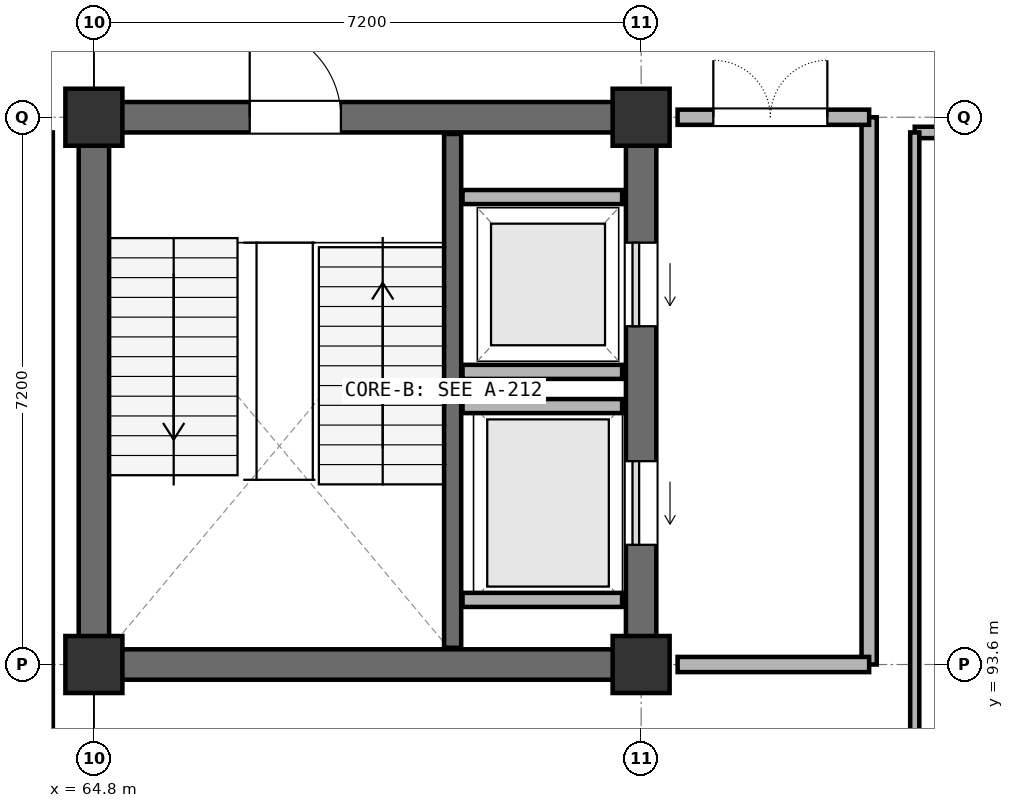
"""IFC4 building model, lengths in metres.
Left out: names, types, materials, properties, quantities, classifications, styles, units other than length and angle.
Written with IfcOpenShell. Run it as: python <this file> out.ifc"""

import sys

from ifc_helpers import new_model, si_unit, direction, frame, frame_2d, origin, origin_2d, place, context, subcontext, project, spatial, rectangle, extrude, element, fill, save


model = new_model("IFC4")
c1 = context("Model", 3, precision=1e-05, world=origin(), true_north=direction((0.0, 1.0)))
c2 = subcontext(c1, "Body", "Model", "MODEL_VIEW")
j1 = project(units=[si_unit("LENGTHUNIT", "METRE"), si_unit("PLANEANGLEUNIT", "RADIAN")], contexts=[c1])
p1 = place(None, origin())
s1 = spatial("IfcSite", under=j1, at=p1, CompositionType="ELEMENT")
p2 = place(p1, origin())
s2 = spatial("IfcBuilding", under=s1, at=p2, CompositionType="ELEMENT")
p3 = place(p2, frame((0.0, 0.0, 14.4)))
s3 = spatial("IfcBuildingStorey", under=s2, at=p3, CompositionType="ELEMENT", Elevation=14.4)
for number, where, z_axis, x_axis in (
    (1, (64.8, 93.6, 0.0), (0.0, 0.0, 1.0), (1.0, 0.0, 0.0)),
    (2, (64.8, 100.8, 0.0), (0.0, 0.0, 1.0), (1.0, 0.0, 0.0)),
    (3, (72.0, 93.6, 0.0), (0.0, 0.0, 1.0), (1.0, 0.0, 0.0)),
    (4, (72.0, 100.8, 0.0), (0.0, 0.0, 1.0), (1.0, 0.0, 0.0)),
):
    element("IfcColumn", number, at=place(p3, frame(where, z_axis=z_axis, x_axis=x_axis)), inside=s3, PredefinedType="COLUMN", context=c2, shape_type="SweptSolid", body=[
        extrude(rectangle(XDim=0.75, YDim=0.75, at=origin_2d()), origin(), (0.0, 0.0, 1.0), 4.2),
    ])
p4 = place(p3, frame((65.15, 93.6, 0.0), z_axis=(0.0, 0.0, 1.0), x_axis=(1.0, 0.0, 0.0)))
e5 = element("IfcWall", 5, at=p4, inside=s3, PredefinedType="SHEAR", context=c2, shape_type="SweptSolid", body=[
    extrude(rectangle(XDim=6.5, YDim=0.4, at=frame_2d((3.25, 0.0))), origin(), (0.0, 0.0, 1.0), 4.2),
])
p5 = place(p3, frame((72.0, 93.95, 0.0), z_axis=(0.0, 0.0, 1.0), x_axis=(0.0, 1.0, 0.0)))
e6 = element("IfcWall", 6, at=p5, inside=s3, PredefinedType="SHEAR", context=c2, shape_type="SweptSolid", body=[
    extrude(rectangle(XDim=6.5, YDim=0.4, at=frame_2d((3.25, 0.0))), origin(), (0.0, 0.0, 1.0), 4.2),
])
p6 = place(p5, frame((1.225, 0.0, 0.0)))
e7 = element("IfcOpeningElement", 7, at=p6, cuts=e6, PredefinedType="OPENING", context=c2, shape_type="SweptSolid", body=[
    extrude(rectangle(XDim=1.1, YDim=2.2, at=frame_2d((0.55, 1.1))), frame((0.0, 0.21, 0.0), z_axis=(0.0, -1.0, 0.0), x_axis=(1.0, 0.0, 0.0)), (0.0, 0.0, 1.0), 0.42),
])
p7 = place(p5, frame((4.1, 0.0, 0.0)))
e8 = element("IfcOpeningElement", 8, at=p7, cuts=e6, PredefinedType="OPENING", context=c2, shape_type="SweptSolid", body=[
    extrude(rectangle(XDim=1.1, YDim=2.2, at=frame_2d((0.55, 1.1))), frame((0.0, 0.21, 0.0), z_axis=(0.0, -1.0, 0.0), x_axis=(1.0, 0.0, 0.0)), (0.0, 0.0, 1.0), 0.42),
])
p8 = place(p3, frame((71.65, 100.8, 0.0), z_axis=(0.0, 0.0, 1.0), x_axis=(-1.0, 0.0, 0.0)))
e9 = element("IfcWall", 9, at=p8, inside=s3, PredefinedType="SHEAR", context=c2, shape_type="SweptSolid", body=[
    extrude(rectangle(XDim=6.5, YDim=0.4, at=frame_2d((3.25, 0.0))), origin(), (0.0, 0.0, 1.0), 4.2),
])
p9 = place(p8, frame((3.6, 0.0, 0.0)))
e10 = element("IfcOpeningElement", 10, at=p9, cuts=e9, PredefinedType="OPENING", context=c2, shape_type="SweptSolid", body=[
    extrude(rectangle(XDim=1.2, YDim=2.2, at=frame_2d((0.6, 1.1))), frame((0.0, 0.21, 0.0), z_axis=(0.0, -1.0, 0.0), x_axis=(1.0, 0.0, 0.0)), (0.0, 0.0, 1.0), 0.42),
])
p10 = place(p3, frame((64.8, 100.45, 0.0), z_axis=(0.0, 0.0, 1.0), x_axis=(0.0, -1.0, 0.0)))
e11 = element("IfcWall", 11, at=p10, inside=s3, PredefinedType="SHEAR", context=c2, shape_type="SweptSolid", body=[
    extrude(rectangle(XDim=6.5, YDim=0.4, at=frame_2d((3.25, 0.0))), origin(), (0.0, 0.0, 1.0), 4.2),
])
p11 = place(p3, frame((69.52, 93.82, 0.0), z_axis=(0.0, 0.0, 1.0), x_axis=(0.0, 1.0, 0.0)))
e12 = element("IfcWall", 12, at=p11, inside=s3, PredefinedType="SHEAR", context=c2, shape_type="SweptSolid", body=[
    extrude(rectangle(XDim=6.76, YDim=0.225, at=frame_2d((3.38, 0.0))), origin(), (0.0, 0.0, 1.0), 4.2),
])
for number, where, z_axis, x_axis in (
    (13, (69.65, 94.45, 0.0), (0.0, 0.0, 1.0), (1.0, 0.0, 0.0)),
    (14, (69.65, 97.0, 0.0), (0.0, 0.0, 1.0), (1.0, 0.0, 0.0)),
    (15, (69.65, 97.45, 0.0), (0.0, 0.0, 1.0), (1.0, 0.0, 0.0)),
    (16, (69.65, 99.75, 0.0), (0.0, 0.0, 1.0), (1.0, 0.0, 0.0)),
):
    element("IfcWall", number, at=place(p3, frame(where, z_axis=z_axis, x_axis=x_axis)), inside=s3, PredefinedType="PARTITIONING", context=c2, shape_type="SweptSolid", body=[
        extrude(rectangle(XDim=2.1, YDim=0.185, at=frame_2d((1.05, 0.0))), origin(), (0.0, 0.0, 1.0), 4.2),
    ])
p12 = place(p3, frame((75.0, 93.6, 0.0), z_axis=(0.0, 0.0, 1.0), x_axis=(0.0, 1.0, 0.0)))
e17 = element("IfcWall", 17, at=p12, inside=s3, PredefinedType="PARTITIONING", context=c2, shape_type="SweptSolid", body=[
    extrude(rectangle(XDim=7.2, YDim=0.2, at=frame_2d((3.6, 0.0))), origin(), (0.0, 0.0, 1.0), 3.08),
])
p13 = place(p3, frame((72.48, 93.6, 0.0), z_axis=(0.0, 0.0, 1.0), x_axis=(1.0, 0.0, 0.0)))
e18 = element("IfcWall", 18, at=p13, inside=s3, PredefinedType="PARTITIONING", context=c2, shape_type="SweptSolid", body=[
    extrude(rectangle(XDim=2.52, YDim=0.2, at=frame_2d((1.26, 0.0))), origin(), (0.0, 0.0, 1.0), 3.08),
])
p14 = place(p3, frame((75.0, 100.8, 0.0), z_axis=(0.0, 0.0, 1.0), x_axis=(-1.0, 0.0, 0.0)))
e19 = element("IfcWall", 19, at=p14, inside=s3, PredefinedType="PARTITIONING", context=c2, shape_type="SweptSolid", body=[
    extrude(rectangle(XDim=2.52, YDim=0.2, at=frame_2d((1.26, 0.0))), origin(), (0.0, 0.0, 1.0), 3.08),
])
p15 = place(p14, frame((0.55, 0.0, 0.0)))
e20 = element("IfcOpeningElement", 20, at=p15, cuts=e19, PredefinedType="OPENING", context=c2, shape_type="SweptSolid", body=[
    extrude(rectangle(XDim=1.5, YDim=2.2, at=frame_2d((0.75, 1.1))), frame((0.0, 0.11, 0.0), z_axis=(0.0, -1.0, 0.0), x_axis=(1.0, 0.0, 0.0)), (0.0, 0.0, 1.0), 0.22),
])
p16 = place(p3, frame((64.2, 100.6, 0.0), z_axis=(0.0, 0.0, 1.0), x_axis=(0.0, -1.0, 0.0)))
e21 = element("IfcWall", 21, at=p16, inside=s3, PredefinedType="PARTITIONING", context=c2, shape_type="SweptSolid", body=[
    extrude(rectangle(XDim=13.4, YDim=0.12, at=frame_2d((6.7, 0.0))), origin(), (0.0, 0.0, 1.0), 3.08),
])
p17 = place(p3, frame((85.8, 100.6, 0.0), z_axis=(0.0, 0.0, 1.0), x_axis=(-1.0, 0.0, 0.0)))
e22 = element("IfcWall", 22, at=p17, inside=s3, PredefinedType="PARTITIONING", context=c2, shape_type="SweptSolid", body=[
    extrude(rectangle(XDim=10.2, YDim=0.15, at=frame_2d((5.1, 0.0))), origin(), (0.0, 0.0, 1.0), 3.08),
])
p18 = place(p17, frame((4.6, 0.0, 0.0)))
e23 = element("IfcOpeningElement", 23, at=p18, cuts=e22, PredefinedType="OPENING", context=c2, shape_type="SweptSolid", body=[
    extrude(rectangle(XDim=1.0, YDim=2.15, at=frame_2d((0.5, 1.075))), frame((0.0, 0.085, 0.0), z_axis=(0.0, -1.0, 0.0), x_axis=(1.0, 0.0, 0.0)), (0.0, 0.0, 1.0), 0.17),
])
p19 = place(p3, frame((75.6, 87.2, 0.0), z_axis=(0.0, 0.0, 1.0), x_axis=(0.0, 1.0, 0.0)))
e24 = element("IfcWall", 24, at=p19, inside=s3, PredefinedType="PARTITIONING", context=c2, shape_type="SweptSolid", body=[
    extrude(rectangle(XDim=13.4, YDim=0.12, at=frame_2d((6.7, 0.0))), origin(), (0.0, 0.0, 1.0), 3.08),
])
p20 = place(p6, origin())
e25 = element("IfcDoor", 25, at=p20, inside=s3, OperationType="SLIDING_TO_LEFT", PredefinedType="DOOR", context=c2, shape_type="SweptSolid", body=[
    extrude(rectangle(XDim=1.1, YDim=2.2, at=frame_2d((0.55, 1.1))), frame((0.0, 0.025, 0.0), z_axis=(0.0, -1.0, 0.0), x_axis=(1.0, 0.0, 0.0)), (0.0, 0.0, 1.0), 0.05),
])
fill(e7, e25)
p21 = place(p7, origin())
e26 = element("IfcDoor", 26, at=p21, inside=s3, OperationType="SLIDING_TO_LEFT", PredefinedType="DOOR", context=c2, shape_type="SweptSolid", body=[
    extrude(rectangle(XDim=1.1, YDim=2.2, at=frame_2d((0.55, 1.1))), frame((0.0, 0.025, 0.0), z_axis=(0.0, -1.0, 0.0), x_axis=(1.0, 0.0, 0.0)), (0.0, 0.0, 1.0), 0.05),
])
fill(e8, e26)
p22 = place(p9, frame((1.2, 0.0, 0.0), z_axis=(0.0, 0.0, 1.0), x_axis=(-1.0, 0.0, 0.0)))
e27 = element("IfcDoor", 27, at=p22, inside=s3, OperationType="SINGLE_SWING_LEFT", PredefinedType="DOOR", context=c2, shape_type="SweptSolid", body=[
    extrude(rectangle(XDim=1.2, YDim=2.2, at=frame_2d((0.6, 1.1))), frame((0.0, 0.025, 0.0), z_axis=(0.0, -1.0, 0.0), x_axis=(1.0, 0.0, 0.0)), (0.0, 0.0, 1.0), 0.05),
])
fill(e10, e27)
p23 = place(p15, frame((1.5, 0.0, 0.0), z_axis=(0.0, 0.0, 1.0), x_axis=(-1.0, 0.0, 0.0)))
e28 = element("IfcDoor", 28, at=p23, inside=s3, OperationType="DOUBLE_DOOR_SINGLE_SWING", PredefinedType="DOOR", context=c2, shape_type="SweptSolid", body=[
    extrude(rectangle(XDim=1.5, YDim=2.2, at=frame_2d((0.75, 1.1))), frame((0.0, 0.025, 0.0), z_axis=(0.0, -1.0, 0.0), x_axis=(1.0, 0.0, 0.0)), (0.0, 0.0, 1.0), 0.05),
])
fill(e20, e28)
save(model, sys.argv[1])
